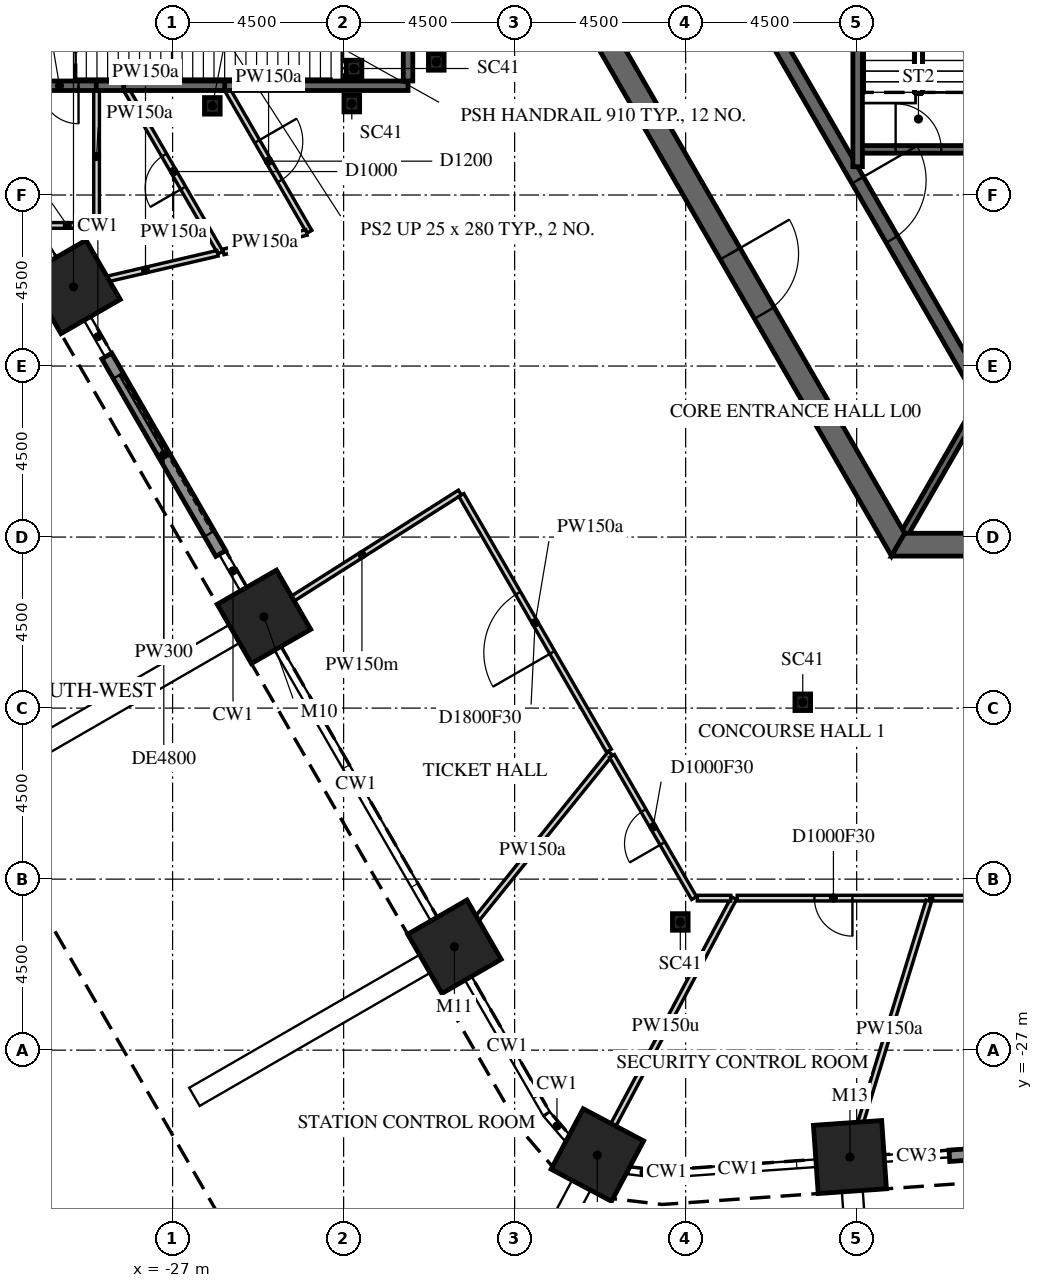
"""IFC4 building model, lengths in metres.
Left out: names, types, materials, properties, quantities, classifications, styles, units other than length and angle.
Written with IfcOpenShell. Run it as: python <this file> out.ifc"""

import sys

from ifc_helpers import new_model, si_unit, direction, frame, frame_2d, origin, origin_2d, place, context, subcontext, project, spatial, polyline, rectangle, i_section, outline, extrude, element, fill, save


model = new_model("IFC4")
c1 = context("Model", 3, precision=1e-05, world=origin(), true_north=direction((0.0, 1.0)))
c2 = subcontext(c1, "Body", "Model", "MODEL_VIEW")
j1 = project(units=[si_unit("LENGTHUNIT", "METRE"), si_unit("PLANEANGLEUNIT", "RADIAN")], contexts=[c1])
p1 = place(None, origin())
s1 = spatial("IfcSite", under=j1, at=p1, CompositionType="ELEMENT")
p2 = place(p1, origin())
s2 = spatial("IfcBuilding", under=s1, at=p2, CompositionType="ELEMENT")
p3 = place(p2, origin())
s3 = spatial("IfcBuildingStorey", under=s2, at=p3, CompositionType="ELEMENT", Elevation=0.0)
for number, where, z_axis, x_axis in (
    (1, (-29.608, -6.918, -2.1), (0.0, 0.0, 1.0), (-0.5, 0.866, 0.0)),
    (2, (-24.596, -15.599, -2.1), (0.0, 0.0, 1.0), (-0.5, 0.866, 0.0)),
    (3, (-19.584, -24.28, -2.1), (0.0, 0.0, 1.0), (-0.5, 0.866, 0.0)),
    (4, (-15.823, -29.76, -2.1), (0.0, 0.0, 1.0), (-0.883, 0.469, 0.0)),
    (5, (-9.177, -29.813, -2.1), (0.0, 0.0, 1.0), (-0.998, -0.07, 0.0)),
):
    element("IfcColumn", number, at=place(p3, frame(where, z_axis=z_axis, x_axis=x_axis)), inside=s3, PredefinedType="COLUMN", context=c2, shape_type="SweptSolid", body=[
        extrude(rectangle(XDim=1.8, YDim=1.8, at=origin_2d()), origin(), (0.0, 0.0, 1.0), 10.85),
    ])
for number, where, z_axis, x_axis in (
    (6, (-13.641, -23.627, -2.1), (0.0, 0.0, 1.0), (1.0, 0.0, 0.0)),
    (7, (-25.954, -2.154, -2.1), (0.0, 0.0, 1.0), (1.0, 0.0, 0.0)),
    (8, (-22.226, -1.171, -2.1), (0.0, 0.0, 1.0), (1.0, 0.0, 0.0)),
    (9, (-20.062, -0.998, -2.1), (0.0, 0.0, 1.0), (1.0, 0.0, 0.0)),
    (10, (-10.419, -17.846, -2.1), (0.0, 0.0, 1.0), (1.0, 0.0, 0.0)),
    (11, (-22.285, -2.095, -2.1), (0.0, 0.0, 1.0), (1.0, 0.0, 0.0)),
):
    element("IfcColumn", number, at=place(p3, frame(where, z_axis=z_axis, x_axis=x_axis)), inside=s3, PredefinedType="COLUMN", context=c2, shape_type="SweptSolid", body=[
        extrude(i_section(OverallWidth=0.412, OverallDepth=0.437, WebThickness=0.036, FlangeThickness=0.058, FilletRadius=0.015, at=origin_2d()), origin(), (0.0, 0.0, 1.0), 10.85),
    ])
p4 = place(p3, frame((-28.732, -8.735, 0.0), z_axis=(0.0, 0.0, 1.0), x_axis=(0.499990139034, -0.866031096941, 0.0)))
e12 = element("IfcWall", 12, at=p4, inside=s3, PredefinedType="SOLIDWALL", context=c2, shape_type="SweptSolid", body=[
    extrude(rectangle(XDim=6.0, YDim=0.3, at=frame_2d((3.0, 0.0))), origin(), (0.0, 0.0, 1.0), 7.823),
])
p5 = place(p4, frame((0.6, 0.0, 0.0)))
e13 = element("IfcOpeningElement", 13, at=p5, cuts=e12, PredefinedType="OPENING", context=c2, shape_type="SweptSolid", body=[
    extrude(rectangle(XDim=4.8, YDim=4.5, at=frame_2d((2.4, 2.25))), frame((0.0, 0.16, 0.0), z_axis=(0.0, -1.0, 0.0), x_axis=(1.0, 0.0, 0.0)), (0.0, 0.0, 1.0), 0.32),
])
p6 = place(p3, frame((-6.562, -29.78, 0.0), z_axis=(0.0, 0.0, 1.0), x_axis=(0.997562190208, 0.069783068626, 0.0)))
e14 = element("IfcWall", 14, at=p6, inside=s3, PredefinedType="SOLIDWALL", context=c2, shape_type="SweptSolid", body=[
    extrude(rectangle(XDim=4.8, YDim=0.3, at=frame_2d((2.4, 0.0))), origin(), (0.0, 0.0, 1.0), 7.823),
])
p7 = place(p6, frame((0.6, 0.0, 0.0)))
e15 = element("IfcOpeningElement", 15, at=p7, cuts=e14, PredefinedType="OPENING", context=c2, shape_type="SweptSolid", body=[
    extrude(rectangle(XDim=3.6, YDim=3.6, at=frame_2d((1.8, 1.8))), frame((0.0, 0.16, 0.0), z_axis=(0.0, -1.0, 0.0), x_axis=(1.0, 0.0, 0.0)), (0.0, 0.0, 1.0), 0.32),
])
p8 = place(p3, frame((-15.819, 0.0, -2.1), z_axis=(0.0, 0.0, 1.0), x_axis=(0.499999880136, -0.866025472988, 0.0)))
e16 = element("IfcWall", 16, at=p8, inside=s3, PredefinedType="SHEAR", context=c2, shape_type="SweptSolid", body=[
    extrude(outline(polyline([(-0.173, -0.3), (15.993, -0.3), (15.646, 0.3), (0.173, 0.3), (-0.173, -0.3)])), origin(), (0.0, 0.0, 1.0), 10.85),
])
p9 = place(p8, frame((6.981, 0.0, 2.1)))
e17 = element("IfcOpeningElement", 17, at=p9, cuts=e16, PredefinedType="OPENING", context=c2, shape_type="SweptSolid", body=[
    extrude(rectangle(XDim=1.8, YDim=2.4, at=frame_2d((0.9, 1.2))), frame((0.0, 0.31, 0.0), z_axis=(0.0, -1.0, 0.0), x_axis=(1.0, 0.0, 0.0)), (0.0, 0.0, 1.0), 0.62),
])
p10 = place(p3, frame((-7.91, -13.7, -2.1), z_axis=(0.0, 0.0, 1.0), x_axis=(1.0, 0.0, 0.0)))
e18 = element("IfcWall", 18, at=p10, inside=s3, PredefinedType="SHEAR", context=c2, shape_type="SweptSolid", body=[
    extrude(outline(polyline([(-0.173, -0.3), (15.993, -0.3), (15.646, 0.3), (0.173, 0.3), (-0.173, -0.3)])), origin(), (0.0, 0.0, 1.0), 10.85),
])
p11 = place(p10, frame((7.31, 0.0, 2.1)))
e19 = element("IfcOpeningElement", 19, at=p11, cuts=e18, PredefinedType="OPENING", context=c2, shape_type="SweptSolid", body=[
    extrude(rectangle(XDim=1.2, YDim=2.4, at=frame_2d((0.6, 1.2))), frame((0.0, 0.31, 0.0), z_axis=(0.0, -1.0, 0.0), x_axis=(1.0, 0.0, 0.0)), (0.0, 0.0, 1.0), 0.62),
])
p12 = place(p3, frame((-11.345, 0.0, -2.1), z_axis=(0.0, 0.0, 1.0), x_axis=(0.499995046907, -0.866028263435, 0.0)))
e20 = element("IfcWall", 20, at=p12, inside=s3, PredefinedType="SHEAR", context=c2, shape_type="SweptSolid", body=[
    extrude(outline(polyline([(-0.101, -0.175), (11.446, -0.175), (11.244, 0.175), (0.101, 0.175), (-0.101, -0.175)])), origin(), (0.0, 0.0, 1.0), 10.85),
])
p13 = place(p12, frame((4.744, 0.0, 2.1)))
e21 = element("IfcOpeningElement", 21, at=p13, cuts=e20, PredefinedType="OPENING", context=c2, shape_type="SweptSolid", body=[
    extrude(rectangle(XDim=1.8, YDim=2.4, at=frame_2d((0.9, 1.2))), frame((0.0, 0.185, 0.0), z_axis=(0.0, -1.0, 0.0), x_axis=(1.0, 0.0, 0.0)), (0.0, 0.0, 1.0), 0.37),
])
p14 = place(p3, frame((-5.773, -10.0, -2.1), z_axis=(0.0, 0.0, 1.0), x_axis=(-0.500038251005, -0.86600331843, 0.0)))
e22 = element("IfcWall", 22, at=p14, inside=s3, PredefinedType="SHEAR", context=c2, shape_type="SweptSolid", body=[
    extrude(rectangle(XDim=3.926, YDim=0.2, at=frame_2d((1.963, 0.0))), origin(), (0.0, 0.0, 1.0), 10.85),
])
p15 = place(p3, frame((-8.975, -3.755, -2.1), z_axis=(0.0, 0.0, 1.0), x_axis=(0.0, 1.0, 0.0)))
e23 = element("IfcWall", 23, at=p15, inside=s3, PredefinedType="SHEAR", context=c2, shape_type="SweptSolid", body=[
    extrude(rectangle(XDim=7.51, YDim=0.25, at=frame_2d((3.755, 0.0))), origin(), (0.0, 0.0, 1.0), 10.85),
])
p16 = place(p3, frame((-8.85, -3.3, -2.1), z_axis=(0.0, 0.0, 1.0), x_axis=(1.0, 0.0, 0.0)))
e24 = element("IfcWall", 24, at=p16, inside=s3, PredefinedType="SHEAR", context=c2, shape_type="SweptSolid", body=[
    extrude(rectangle(XDim=2.95, YDim=0.2, at=frame_2d((1.475, 0.0))), origin(), (0.0, 0.0, 1.0), 10.85),
])
p17 = place(p16, frame((0.875, 0.0, 2.1)))
e25 = element("IfcOpeningElement", 25, at=p17, cuts=e24, PredefinedType="OPENING", context=c2, shape_type="SweptSolid", body=[
    extrude(rectangle(XDim=1.2, YDim=2.4, at=frame_2d((0.6, 1.2))), frame((0.0, 0.11, 0.0), z_axis=(0.0, -1.0, 0.0), x_axis=(1.0, 0.0, 0.0)), (0.0, 0.0, 1.0), 0.22),
])
p18 = place(p3, frame((-29.0, -1.625, 0.0), z_axis=(0.0, 0.0, 1.0), x_axis=(-1.0, 0.0, 0.0)))
e26 = element("IfcWall", 26, at=p18, inside=s3, PredefinedType="PARTITIONING", context=c2, shape_type="SweptSolid", body=[
    extrude(rectangle(XDim=1.95, YDim=0.25, at=frame_2d((0.975, 0.0))), origin(), (0.0, 0.0, 1.0), 8.75),
])
p19 = place(p18, frame((0.475, 0.0, 0.0)))
e27 = element("IfcOpeningElement", 27, at=p19, cuts=e26, PredefinedType="OPENING", context=c2, shape_type="SweptSolid", body=[
    extrude(rectangle(XDim=1.0, YDim=2.1, at=frame_2d((0.5, 1.05))), frame((0.0, 0.135, 0.0), z_axis=(0.0, -1.0, 0.0), x_axis=(1.0, 0.0, 0.0)), (0.0, 0.0, 1.0), 0.27),
])
p20 = place(p3, frame((-29.0, -5.3, 0.0), z_axis=(0.0, 0.0, 1.0), x_axis=(-1.0, 0.0, 0.0)))
e28 = element("IfcWall", 28, at=p20, inside=s3, PredefinedType="PARTITIONING", context=c2, shape_type="SweptSolid", body=[
    extrude(rectangle(XDim=1.542, YDim=0.15, at=frame_2d((0.771, 0.0))), origin(), (0.0, 0.0, 1.0), 8.75),
])
p21 = place(p3, frame((-29.0, -1.75, 0.0), z_axis=(0.0, 0.0, 1.0), x_axis=(0.0, -1.0, 0.0)))
e29 = element("IfcWall", 29, at=p21, inside=s3, PredefinedType="PARTITIONING", context=c2, shape_type="SweptSolid", body=[
    extrude(rectangle(XDim=3.475, YDim=0.15, at=frame_2d((1.738, 0.0))), origin(), (0.0, 0.0, 1.0), 8.75),
])
p22 = place(p3, frame((-25.741, -6.015, 0.0), z_axis=(0.0, 0.0, 1.0), x_axis=(-0.500084325422, 0.865976713005, 0.0)))
e30 = element("IfcWall", 30, at=p22, inside=s3, PredefinedType="PARTITIONING", context=c2, shape_type="SweptSolid", body=[
    extrude(rectangle(XDim=4.925, YDim=0.15, at=frame_2d((2.462, 0.0))), origin(), (0.0, 0.0, 1.0), 8.75),
])
p23 = place(p22, frame((1.962, 0.0, 0.0)))
e31 = element("IfcOpeningElement", 31, at=p23, cuts=e30, PredefinedType="OPENING", context=c2, shape_type="SweptSolid", body=[
    extrude(rectangle(XDim=1.0, YDim=2.1, at=frame_2d((0.5, 1.05))), frame((0.0, 0.085, 0.0), z_axis=(0.0, -1.0, 0.0), x_axis=(1.0, 0.0, 0.0)), (0.0, 0.0, 1.0), 0.17),
])
p24 = place(p3, frame((-28.264, -1.625, 0.0), z_axis=(0.0, 0.0, 1.0), x_axis=(-1.0, 0.0, 0.0)))
e32 = element("IfcWall", 32, at=p24, inside=s3, PredefinedType="PARTITIONING", context=c2, shape_type="SweptSolid", body=[
    extrude(rectangle(XDim=0.746, YDim=0.25, at=frame_2d((0.373, 0.0))), origin(), (0.0, 0.0, 1.0), 8.75),
])
p25 = place(p3, frame((-25.817, -6.033, 0.0), z_axis=(0.0, 0.0, 1.0), x_axis=(-0.973795851952, -0.227423918535, 0.0)))
e33 = element("IfcWall", 33, at=p25, inside=s3, PredefinedType="PARTITIONING", context=c2, shape_type="SweptSolid", body=[
    extrude(rectangle(XDim=3.893, YDim=0.15, at=frame_2d((1.946, 0.0))), origin(), (0.0, 0.0, 1.0), 8.75),
])
p26 = place(p3, frame((-25.548, -1.75, 0.0), z_axis=(0.0, 0.0, 1.0), x_axis=(0.500065367758, -0.865987660403, 0.0)))
e34 = element("IfcWall", 34, at=p26, inside=s3, PredefinedType="PARTITIONING", context=c2, shape_type="SweptSolid", body=[
    extrude(rectangle(XDim=4.293, YDim=0.15, at=frame_2d((2.147, 0.0))), origin(), (0.0, 0.0, 1.0), 8.75),
])
p27 = place(p26, frame((1.547, 0.0, 0.0)))
e35 = element("IfcOpeningElement", 35, at=p27, cuts=e34, PredefinedType="OPENING", context=c2, shape_type="SweptSolid", body=[
    extrude(rectangle(XDim=1.2, YDim=2.1, at=frame_2d((0.6, 1.05))), frame((0.0, 0.085, 0.0), z_axis=(0.0, -1.0, 0.0), x_axis=(1.0, 0.0, 0.0)), (0.0, 0.0, 1.0), 0.17),
])
p28 = place(p3, frame((-25.608, -1.625, 0.0), z_axis=(0.0, 0.0, 1.0), x_axis=(-1.0, 0.0, 0.0)))
e36 = element("IfcWall", 36, at=p28, inside=s3, PredefinedType="PARTITIONING", context=c2, shape_type="SweptSolid", body=[
    extrude(rectangle(XDim=2.678, YDim=0.25, at=frame_2d((1.339, 0.0))), origin(), (0.0, 0.0, 1.0), 8.75),
])
p29 = place(p3, frame((-24.596, -15.599, 0.0), z_axis=(0.0, 0.0, 1.0), x_axis=(0.844482111796, 0.535583758956, 0.0)))
e37 = element("IfcWall", 37, at=p29, inside=s3, PredefinedType="PARTITIONING", context=c2, shape_type="SweptSolid", body=[
    extrude(rectangle(XDim=6.105, YDim=0.15, at=frame_2d((3.053, 0.0))), origin(), (0.0, 0.0, 1.0), 8.297),
])
p30 = place(p3, frame((-23.477, -5.486, 0.0), z_axis=(0.0, 0.0, 1.0), x_axis=(-0.97376098573, -0.227573158942, 0.0)))
e38 = element("IfcWall", 38, at=p30, inside=s3, PredefinedType="PARTITIONING", context=c2, shape_type="SweptSolid", body=[
    extrude(rectangle(XDim=2.246, YDim=0.15, at=frame_2d((1.123, 0.0))), origin(), (0.0, 0.0, 1.0), 8.75),
])
p31 = place(p3, frame((-20.805, -1.625, 0.0), z_axis=(0.0, 0.0, 1.0), x_axis=(-1.0, 0.0, 0.0)))
e39 = element("IfcWall", 39, at=p31, inside=s3, PredefinedType="PARTITIONING", context=c2, shape_type="SweptSolid", body=[
    extrude(rectangle(XDim=4.825, YDim=0.25, at=frame_2d((2.413, 0.0))), origin(), (0.0, 0.0, 1.0), 8.75),
])
p32 = place(p3, frame((-20.805, 1.45, 0.0), z_axis=(0.0, 0.0, 1.0), x_axis=(0.0, -1.0, 0.0)))
e40 = element("IfcWall", 40, at=p32, inside=s3, PredefinedType="PARTITIONING", context=c2, shape_type="SweptSolid", body=[
    extrude(rectangle(XDim=2.95, YDim=0.25, at=frame_2d((1.475, 0.0))), origin(), (0.0, 0.0, 1.0), 8.75),
])
p33 = place(p32, frame((0.875, 0.0, 0.0)))
e41 = element("IfcOpeningElement", 41, at=p33, cuts=e40, PredefinedType="OPENING", context=c2, shape_type="SweptSolid", body=[
    extrude(rectangle(XDim=1.2, YDim=2.1, at=frame_2d((0.6, 1.05))), frame((0.0, 0.135, 0.0), z_axis=(0.0, -1.0, 0.0), x_axis=(1.0, 0.0, 0.0)), (0.0, 0.0, 1.0), 0.27),
])
p34 = place(p3, frame((-19.584, -24.28, 0.0), z_axis=(0.0, 0.0, 1.0), x_axis=(0.627759019013, 0.778407742798, 0.0)))
e42 = element("IfcWall", 42, at=p34, inside=s3, PredefinedType="PARTITIONING", context=c2, shape_type="SweptSolid", body=[
    extrude(rectangle(XDim=6.539, YDim=0.15, at=frame_2d((3.27, 0.0))), origin(), (0.0, 0.0, 1.0), 8.75),
])
p35 = place(p3, frame((-15.519, -19.12, 0.0), z_axis=(0.0, 0.0, 1.0), x_axis=(-0.49998639067, 0.866033260992, 0.0)))
e43 = element("IfcWall", 43, at=p35, inside=s3, PredefinedType="PARTITIONING", context=c2, shape_type="SweptSolid", body=[
    extrude(rectangle(XDim=7.767, YDim=0.15, at=frame_2d((3.883, 0.0))), origin(), (0.0, 0.0, 1.0), 8.75),
])
p36 = place(p35, frame((2.983, 0.0, 0.0)))
e44 = element("IfcOpeningElement", 44, at=p36, cuts=e43, PredefinedType="OPENING", context=c2, shape_type="SweptSolid", body=[
    extrude(rectangle(XDim=1.8, YDim=2.1, at=frame_2d((0.9, 1.05))), frame((0.0, 0.085, 0.0), z_axis=(0.0, -1.0, 0.0), x_axis=(1.0, 0.0, 0.0)), (0.0, 0.0, 1.0), 0.17),
])
p37 = place(p3, frame((-15.824, -29.76, 0.0), z_axis=(0.0, 0.0, 1.0), x_axis=(0.469533647799, 0.882914578872, 0.0)))
e45 = element("IfcWall", 45, at=p37, inside=s3, PredefinedType="PARTITIONING", context=c2, shape_type="SweptSolid", body=[
    extrude(rectangle(XDim=7.656, YDim=0.15, at=frame_2d((3.828, 0.0))), origin(), (0.0, 0.0, 1.0), 8.217),
])
p38 = place(p3, frame((-13.279, -23.0, 0.0), z_axis=(0.0, 0.0, 1.0), x_axis=(-0.500017657896, 0.866015208753, 0.0)))
e46 = element("IfcWall", 46, at=p38, inside=s3, PredefinedType="PARTITIONING", context=c2, shape_type="SweptSolid", body=[
    extrude(rectangle(XDim=4.319, YDim=0.15, at=frame_2d((2.16, 0.0))), origin(), (0.0, 0.0, 1.0), 8.75),
])
p39 = place(p38, frame((1.66, 0.0, 0.0)))
e47 = element("IfcOpeningElement", 47, at=p39, cuts=e46, PredefinedType="OPENING", context=c2, shape_type="SweptSolid", body=[
    extrude(rectangle(XDim=1.0, YDim=2.1, at=frame_2d((0.5, 1.05))), frame((0.0, 0.085, 0.0), z_axis=(0.0, -1.0, 0.0), x_axis=(1.0, 0.0, 0.0)), (0.0, 0.0, 1.0), 0.17),
])
p40 = place(p3, frame((-13.192, -23.0, 0.0), z_axis=(0.0, 0.0, 1.0), x_axis=(1.0, 0.0, 0.0)))
e48 = element("IfcWall", 48, at=p40, inside=s3, PredefinedType="PARTITIONING", context=c2, shape_type="SweptSolid", body=[
    extrude(rectangle(XDim=0.878, YDim=0.15, at=frame_2d((0.439, 0.0))), origin(), (0.0, 0.0, 1.0), 8.75),
])
p41 = place(p3, frame((-7.08, -23.0, 0.0), z_axis=(0.0, 0.0, 1.0), x_axis=(-1.0, 0.0, 0.0)))
e49 = element("IfcWall", 49, at=p41, inside=s3, PredefinedType="PARTITIONING", context=c2, shape_type="SweptSolid", body=[
    extrude(rectangle(XDim=5.064, YDim=0.15, at=frame_2d((2.532, 0.0))), origin(), (0.0, 0.0, 1.0), 8.75),
])
p42 = place(p41, frame((2.032, 0.0, 0.0)))
e50 = element("IfcOpeningElement", 50, at=p42, cuts=e49, PredefinedType="OPENING", context=c2, shape_type="SweptSolid", body=[
    extrude(rectangle(XDim=1.0, YDim=2.1, at=frame_2d((0.5, 1.05))), frame((0.0, 0.085, 0.0), z_axis=(0.0, -1.0, 0.0), x_axis=(1.0, 0.0, 0.0)), (0.0, 0.0, 1.0), 0.17),
])
p43 = place(p3, frame((-9.177, -29.813, 0.0), z_axis=(0.0, 0.0, 1.0), x_axis=(0.294180751952, 0.955749802606, 0.0)))
e51 = element("IfcWall", 51, at=p43, inside=s3, PredefinedType="PARTITIONING", context=c2, shape_type="SweptSolid", body=[
    extrude(rectangle(XDim=7.05, YDim=0.15, at=frame_2d((3.525, 0.0))), origin(), (0.0, 0.0, 1.0), 8.75),
])
p44 = place(p3, frame((8.759, -23.0, 0.0), z_axis=(0.0, 0.0, 1.0), x_axis=(-1.0, 0.0, 0.0)))
e52 = element("IfcWall", 52, at=p44, inside=s3, PredefinedType="PARTITIONING", context=c2, shape_type="SweptSolid", body=[
    extrude(rectangle(XDim=15.76, YDim=0.15, at=frame_2d((7.88, 0.0))), origin(), (0.0, 0.0, 1.0), 8.75),
])
p45 = place(p44, frame((6.98, 0.0, 0.0)))
e53 = element("IfcOpeningElement", 53, at=p45, cuts=e52, PredefinedType="OPENING", context=c2, shape_type="SweptSolid", body=[
    extrude(rectangle(XDim=1.8, YDim=2.1, at=frame_2d((0.9, 1.05))), frame((0.0, 0.085, 0.0), z_axis=(0.0, -1.0, 0.0), x_axis=(1.0, 0.0, 0.0)), (0.0, 0.0, 1.0), 0.17),
])
p46 = place(p5, frame((0.0, -0.025, 0.0)))
e54 = element("IfcDoor", 54, at=p46, inside=s3, OperationType="DOUBLE_DOOR_SLIDING", PredefinedType="DOOR", context=c2, shape_type="SweptSolid", body=[
    extrude(rectangle(XDim=4.8, YDim=4.5, at=frame_2d((2.4, 2.25))), frame((0.0, 0.025, 0.0), z_axis=(0.0, -1.0, 0.0), x_axis=(1.0, 0.0, 0.0)), (0.0, 0.0, 1.0), 0.05),
])
fill(e13, e54)
p47 = place(p9, origin())
e55 = element("IfcDoor", 55, at=p47, inside=s3, OperationType="DOUBLE_DOOR_SINGLE_SWING", PredefinedType="DOOR", context=c2, shape_type="SweptSolid", body=[
    extrude(rectangle(XDim=1.8, YDim=2.4, at=frame_2d((0.9, 1.2))), frame((0.0, 0.025, 0.0), z_axis=(0.0, -1.0, 0.0), x_axis=(1.0, 0.0, 0.0)), (0.0, 0.0, 1.0), 0.05),
])
fill(e17, e55)
p48 = place(p13, origin())
e56 = element("IfcDoor", 56, at=p48, inside=s3, OperationType="DOUBLE_DOOR_SINGLE_SWING", PredefinedType="DOOR", context=c2, shape_type="SweptSolid", body=[
    extrude(rectangle(XDim=1.8, YDim=2.4, at=frame_2d((0.9, 1.2))), frame((0.0, 0.025, 0.0), z_axis=(0.0, -1.0, 0.0), x_axis=(1.0, 0.0, 0.0)), (0.0, 0.0, 1.0), 0.05),
])
fill(e21, e56)
p49 = place(p17, origin())
e57 = element("IfcDoor", 57, at=p49, inside=s3, OperationType="SINGLE_SWING_LEFT", PredefinedType="DOOR", context=c2, shape_type="SweptSolid", body=[
    extrude(rectangle(XDim=1.2, YDim=2.4, at=frame_2d((0.6, 1.2))), frame((0.0, 0.025, 0.0), z_axis=(0.0, -1.0, 0.0), x_axis=(1.0, 0.0, 0.0)), (0.0, 0.0, 1.0), 0.05),
])
fill(e25, e57)
p50 = place(p19, origin())
e58 = element("IfcDoor", 58, at=p50, inside=s3, OperationType="SINGLE_SWING_RIGHT", PredefinedType="DOOR", context=c2, shape_type="SweptSolid", body=[
    extrude(rectangle(XDim=1.0, YDim=2.1, at=frame_2d((0.5, 1.05))), frame((0.0, 0.025, 0.0), z_axis=(0.0, -1.0, 0.0), x_axis=(1.0, 0.0, 0.0)), (0.0, 0.0, 1.0), 0.05),
])
fill(e27, e58)
p51 = place(p23, origin())
e59 = element("IfcDoor", 59, at=p51, inside=s3, OperationType="SINGLE_SWING_LEFT", PredefinedType="DOOR", context=c2, shape_type="SweptSolid", body=[
    extrude(rectangle(XDim=1.0, YDim=2.1, at=frame_2d((0.5, 1.05))), frame((0.0, 0.025, 0.0), z_axis=(0.0, -1.0, 0.0), x_axis=(1.0, 0.0, 0.0)), (0.0, 0.0, 1.0), 0.05),
])
fill(e31, e59)
p52 = place(p27, origin())
e60 = element("IfcDoor", 60, at=p52, inside=s3, OperationType="SINGLE_SWING_LEFT", PredefinedType="DOOR", context=c2, shape_type="SweptSolid", body=[
    extrude(rectangle(XDim=1.2, YDim=2.1, at=frame_2d((0.6, 1.05))), frame((0.0, 0.025, 0.0), z_axis=(0.0, -1.0, 0.0), x_axis=(1.0, 0.0, 0.0)), (0.0, 0.0, 1.0), 0.05),
])
fill(e35, e60)
p53 = place(p36, origin())
e61 = element("IfcDoor", 61, at=p53, inside=s3, OperationType="DOUBLE_DOOR_SINGLE_SWING", PredefinedType="DOOR", context=c2, shape_type="SweptSolid", body=[
    extrude(rectangle(XDim=1.8, YDim=2.1, at=frame_2d((0.9, 1.05))), frame((0.0, 0.025, 0.0), z_axis=(0.0, -1.0, 0.0), x_axis=(1.0, 0.0, 0.0)), (0.0, 0.0, 1.0), 0.05),
])
fill(e44, e61)
p54 = place(p39, origin())
e62 = element("IfcDoor", 62, at=p54, inside=s3, OperationType="SINGLE_SWING_RIGHT", PredefinedType="DOOR", context=c2, shape_type="SweptSolid", body=[
    extrude(rectangle(XDim=1.0, YDim=2.1, at=frame_2d((0.5, 1.05))), frame((0.0, 0.025, 0.0), z_axis=(0.0, -1.0, 0.0), x_axis=(1.0, 0.0, 0.0)), (0.0, 0.0, 1.0), 0.05),
])
fill(e47, e62)
p55 = place(p42, origin())
e63 = element("IfcDoor", 63, at=p55, inside=s3, OperationType="SINGLE_SWING_RIGHT", PredefinedType="DOOR", context=c2, shape_type="SweptSolid", body=[
    extrude(rectangle(XDim=1.0, YDim=2.1, at=frame_2d((0.5, 1.05))), frame((0.0, 0.025, 0.0), z_axis=(0.0, -1.0, 0.0), x_axis=(1.0, 0.0, 0.0)), (0.0, 0.0, 1.0), 0.05),
])
fill(e50, e63)
save(model, sys.argv[1])
